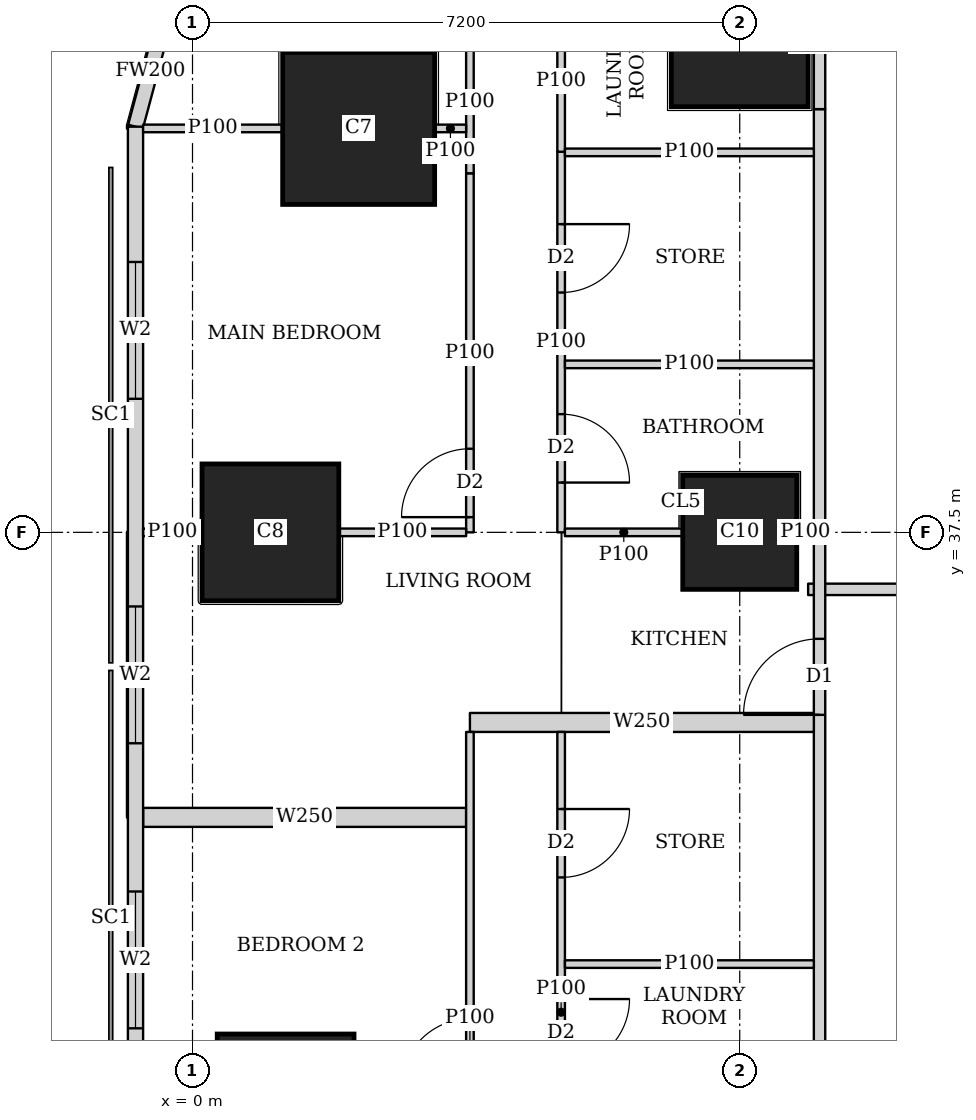
"""IFC4 building model, lengths in metres.
Left out: names, types, materials, properties, quantities, classifications, styles, units other than length and angle.
Written with IfcOpenShell. Run it as: python <this file> out.ifc"""

import sys

from ifc_helpers import new_model, si_unit, direction, frame, frame_2d, origin, origin_2d, place, context, subcontext, project, spatial, rectangle, extrude, element, fill, save


model = new_model("IFC4")
c1 = context("Model", 3, precision=1e-05, world=origin(), true_north=direction((0.0, 1.0)))
c2 = subcontext(c1, "Body", "Model", "MODEL_VIEW")
j1 = project(units=[si_unit("LENGTHUNIT", "METRE"), si_unit("PLANEANGLEUNIT", "RADIAN")], contexts=[c1])
p1 = place(None, origin())
s1 = spatial("IfcSite", under=j1, at=p1, CompositionType="ELEMENT")
p2 = place(p1, origin())
s2 = spatial("IfcBuilding", under=s1, at=p2, CompositionType="ELEMENT")
p3 = place(p2, frame((0.0, 0.0, 169.55)))
s3 = spatial("IfcBuildingStorey", under=s2, at=p3, CompositionType="ELEMENT", Elevation=169.55)
for number, where, z_axis, x_axis in (
    (1, (1.225, 30.0, 0.0), (0.0, 0.0, 1.0), (1.0, 0.0, 0.0)),
    (2, (1.025, 37.5, 0.0), (0.0, 0.0, 1.0), (1.0, 0.0, 0.0)),
):
    element("IfcColumn", number, at=place(p3, frame(where, z_axis=z_axis, x_axis=x_axis)), inside=s3, PredefinedType="COLUMN", context=c2, shape_type="SweptSolid", body=[
        extrude(rectangle(XDim=1.8, YDim=1.8, at=origin_2d()), origin(), (0.0, 0.0, 1.0), 3.75),
    ])
p4 = place(p3, frame((7.2, 37.5, 0.0), z_axis=(0.0, 0.0, 1.0), x_axis=(1.0, 0.0, 0.0)))
e3 = element("IfcColumn", 3, at=p4, inside=s3, PredefinedType="COLUMN", context=c2, shape_type="SweptSolid", body=[
    extrude(rectangle(XDim=1.5, YDim=1.5, at=origin_2d()), origin(), (0.0, 0.0, 1.0), 3.75),
])
p5 = place(p3, frame((2.186, 42.814, 0.0), z_axis=(0.0, 0.0, 1.0), x_axis=(1.0, 0.0, 0.0)))
e4 = element("IfcColumn", 4, at=p5, inside=s3, PredefinedType="COLUMN", context=c2, shape_type="SweptSolid", body=[
    extrude(rectangle(XDim=2.0, YDim=2.0, at=origin_2d()), origin(), (0.0, 0.0, 1.0), 3.75),
])
p6 = place(p3, frame((7.2, 44.0, 0.0), z_axis=(0.0, 0.0, 1.0), x_axis=(1.0, 0.0, 0.0)))
e5 = element("IfcColumn", 5, at=p6, inside=s3, PredefinedType="COLUMN", context=c2, shape_type="SweptSolid", body=[
    extrude(rectangle(XDim=1.8, YDim=1.8, at=origin_2d()), origin(), (0.0, 0.0, 1.0), 3.75),
])
p7 = place(p3, frame((-0.358, 44.298, 0.0), z_axis=(0.0, 0.0, 1.0), x_axis=(-0.259168954497, -0.965832000415, 0.0)))
e6 = element("IfcWall", 6, at=p7, inside=s3, PredefinedType="SOLIDWALL", context=c2, shape_type="SweptSolid", body=[
    extrude(rectangle(XDim=1.513, YDim=0.2, at=frame_2d((0.756, 0.0))), origin(), (0.0, 0.0, 1.0), 3.5),
])
p8 = place(p3, frame((-0.75, 42.837, 0.0), z_axis=(0.0, 0.0, 1.0), x_axis=(0.0, -1.0, 0.0)))
e7 = element("IfcWall", 7, at=p8, inside=s3, PredefinedType="SOLIDWALL", context=c2, shape_type="SweptSolid", body=[
    extrude(rectangle(XDim=40.674, YDim=0.2, at=frame_2d((20.337, 0.0))), origin(), (0.0, 0.0, 1.0), 3.5),
])
p9 = place(p8, frame((1.78, 0.0, 0.9)))
e8 = element("IfcOpeningElement", 8, at=p9, cuts=e7, PredefinedType="OPENING", context=c2, shape_type="SweptSolid", body=[
    extrude(rectangle(XDim=1.8, YDim=1.5, at=frame_2d((0.9, 0.75))), frame((0.0, 0.11, 0.0), z_axis=(0.0, -1.0, 0.0), x_axis=(1.0, 0.0, 0.0)), (0.0, 0.0, 1.0), 0.22),
])
p10 = place(p8, frame((6.312, 0.0, 0.9)))
e9 = element("IfcOpeningElement", 9, at=p10, cuts=e7, PredefinedType="OPENING", context=c2, shape_type="SweptSolid", body=[
    extrude(rectangle(XDim=1.8, YDim=1.5, at=frame_2d((0.9, 0.75))), frame((0.0, 0.11, 0.0), z_axis=(0.0, -1.0, 0.0), x_axis=(1.0, 0.0, 0.0)), (0.0, 0.0, 1.0), 0.22),
])
p11 = place(p8, frame((10.062, 0.0, 0.9)))
e10 = element("IfcOpeningElement", 10, at=p11, cuts=e7, PredefinedType="OPENING", context=c2, shape_type="SweptSolid", body=[
    extrude(rectangle(XDim=1.8, YDim=1.5, at=frame_2d((0.9, 0.75))), frame((0.0, 0.11, 0.0), z_axis=(0.0, -1.0, 0.0), x_axis=(1.0, 0.0, 0.0)), (0.0, 0.0, 1.0), 0.22),
])
p12 = place(p8, frame((13.812, 0.0, 0.9)))
e11 = element("IfcOpeningElement", 11, at=p12, cuts=e7, PredefinedType="OPENING", context=c2, shape_type="SweptSolid", body=[
    extrude(rectangle(XDim=1.8, YDim=1.5, at=frame_2d((0.9, 0.75))), frame((0.0, 0.11, 0.0), z_axis=(0.0, -1.0, 0.0), x_axis=(1.0, 0.0, 0.0)), (0.0, 0.0, 1.0), 0.22),
])
p13 = place(p8, frame((17.562, 0.0, 0.9)))
e12 = element("IfcOpeningElement", 12, at=p13, cuts=e7, PredefinedType="OPENING", context=c2, shape_type="SweptSolid", body=[
    extrude(rectangle(XDim=1.8, YDim=1.5, at=frame_2d((0.9, 0.75))), frame((0.0, 0.11, 0.0), z_axis=(0.0, -1.0, 0.0), x_axis=(1.0, 0.0, 0.0)), (0.0, 0.0, 1.0), 0.22),
])
p14 = place(p8, frame((21.312, 0.0, 0.9)))
e13 = element("IfcOpeningElement", 13, at=p14, cuts=e7, PredefinedType="OPENING", context=c2, shape_type="SweptSolid", body=[
    extrude(rectangle(XDim=1.8, YDim=1.5, at=frame_2d((0.9, 0.75))), frame((0.0, 0.11, 0.0), z_axis=(0.0, -1.0, 0.0), x_axis=(1.0, 0.0, 0.0)), (0.0, 0.0, 1.0), 0.22),
])
p15 = place(p8, frame((25.062, 0.0, 0.9)))
e14 = element("IfcOpeningElement", 14, at=p15, cuts=e7, PredefinedType="OPENING", context=c2, shape_type="SweptSolid", body=[
    extrude(rectangle(XDim=1.8, YDim=1.5, at=frame_2d((0.9, 0.75))), frame((0.0, 0.11, 0.0), z_axis=(0.0, -1.0, 0.0), x_axis=(1.0, 0.0, 0.0)), (0.0, 0.0, 1.0), 0.22),
])
p16 = place(p8, frame((28.812, 0.0, 0.9)))
e15 = element("IfcOpeningElement", 15, at=p16, cuts=e7, PredefinedType="OPENING", context=c2, shape_type="SweptSolid", body=[
    extrude(rectangle(XDim=1.8, YDim=1.5, at=frame_2d((0.9, 0.75))), frame((0.0, 0.11, 0.0), z_axis=(0.0, -1.0, 0.0), x_axis=(1.0, 0.0, 0.0)), (0.0, 0.0, 1.0), 0.22),
])
p17 = place(p8, frame((32.562, 0.0, 0.9)))
e16 = element("IfcOpeningElement", 16, at=p17, cuts=e7, PredefinedType="OPENING", context=c2, shape_type="SweptSolid", body=[
    extrude(rectangle(XDim=1.8, YDim=1.5, at=frame_2d((0.9, 0.75))), frame((0.0, 0.11, 0.0), z_axis=(0.0, -1.0, 0.0), x_axis=(1.0, 0.0, 0.0)), (0.0, 0.0, 1.0), 0.22),
])
p18 = place(p8, frame((37.094, 0.0, 0.9)))
e17 = element("IfcOpeningElement", 17, at=p18, cuts=e7, PredefinedType="OPENING", context=c2, shape_type="SweptSolid", body=[
    extrude(rectangle(XDim=1.8, YDim=1.5, at=frame_2d((0.9, 0.75))), frame((0.0, 0.11, 0.0), z_axis=(0.0, -1.0, 0.0), x_axis=(1.0, 0.0, 0.0)), (0.0, 0.0, 1.0), 0.22),
])
p19 = place(p3, frame((8.25, 1.957, 0.0), z_axis=(0.0, 0.0, 1.0), x_axis=(0.0, 1.0, 0.0)))
e18 = element("IfcWall", 18, at=p19, inside=s3, PredefinedType="SOLIDWALL", context=c2, shape_type="SweptSolid", body=[
    extrude(rectangle(XDim=41.111, YDim=0.15, at=frame_2d((20.556, 0.0))), origin(), (0.0, 0.0, 1.0), 3.5),
])
p20 = place(p19, frame((10.642, 0.0, 0.0)))
e19 = element("IfcOpeningElement", 19, at=p20, cuts=e18, PredefinedType="OPENING", context=c2, shape_type="SweptSolid", body=[
    extrude(rectangle(XDim=1.0, YDim=2.1, at=frame_2d((0.5, 1.05))), frame((0.0, 0.085, 0.0), z_axis=(0.0, -1.0, 0.0), x_axis=(1.0, 0.0, 0.0)), (0.0, 0.0, 1.0), 0.17),
])
p21 = place(p19, frame((15.042, 0.0, 0.0)))
e20 = element("IfcOpeningElement", 20, at=p21, cuts=e18, PredefinedType="OPENING", context=c2, shape_type="SweptSolid", body=[
    extrude(rectangle(XDim=1.0, YDim=2.1, at=frame_2d((0.5, 1.05))), frame((0.0, 0.085, 0.0), z_axis=(0.0, -1.0, 0.0), x_axis=(1.0, 0.0, 0.0)), (0.0, 0.0, 1.0), 0.17),
])
p22 = place(p19, frame((22.543, 0.0, 0.0)))
e21 = element("IfcOpeningElement", 21, at=p22, cuts=e18, PredefinedType="OPENING", context=c2, shape_type="SweptSolid", body=[
    extrude(rectangle(XDim=1.0, YDim=2.1, at=frame_2d((0.5, 1.05))), frame((0.0, 0.085, 0.0), z_axis=(0.0, -1.0, 0.0), x_axis=(1.0, 0.0, 0.0)), (0.0, 0.0, 1.0), 0.17),
])
p23 = place(p19, frame((33.142, 0.0, 0.0)))
e22 = element("IfcOpeningElement", 22, at=p23, cuts=e18, PredefinedType="OPENING", context=c2, shape_type="SweptSolid", body=[
    extrude(rectangle(XDim=1.0, YDim=2.1, at=frame_2d((0.5, 1.05))), frame((0.0, 0.085, 0.0), z_axis=(0.0, -1.0, 0.0), x_axis=(1.0, 0.0, 0.0)), (0.0, 0.0, 1.0), 0.17),
])
p24 = place(p3, frame((8.25, 43.068, 0.0), z_axis=(0.0, 0.0, 1.0), x_axis=(0.0, 1.0, 0.0)))
e23 = element("IfcWall", 23, at=p24, inside=s3, PredefinedType="SOLIDWALL", context=c2, shape_type="SweptSolid", body=[
    extrude(rectangle(XDim=1.805, YDim=0.15, at=frame_2d((0.902, 0.0))), origin(), (0.0, 0.0, 1.0), 2.1),
])
p25 = place(p3, frame((8.1, 36.75, 0.0), z_axis=(0.0, 0.0, 1.0), x_axis=(1.0, 0.0, 0.0)))
e24 = element("IfcWall", 24, at=p25, inside=s3, PredefinedType="SOLIDWALL", context=c2, shape_type="SweptSolid", body=[
    extrude(rectangle(XDim=5.549, YDim=0.15, at=frame_2d((2.774, 0.0))), origin(), (0.0, 0.0, 1.0), 3.5),
])
p26 = place(p25, frame((2.725, 0.0, 0.0)))
e25 = element("IfcOpeningElement", 25, at=p26, cuts=e24, PredefinedType="OPENING", context=c2, shape_type="SweptSolid", body=[
    extrude(rectangle(XDim=1.0, YDim=2.1, at=frame_2d((0.5, 1.05))), frame((0.0, 0.085, 0.0), z_axis=(0.0, -1.0, 0.0), x_axis=(1.0, 0.0, 0.0)), (0.0, 0.0, 1.0), 0.17),
])
p27 = place(p3, frame((3.65, 26.25, 0.0), z_axis=(0.0, 0.0, 1.0), x_axis=(0.0, 1.0, 0.0)))
e26 = element("IfcWall", 26, at=p27, inside=s3, PredefinedType="PARTITIONING", context=c2, shape_type="SweptSolid", body=[
    extrude(rectangle(XDim=8.624, YDim=0.1, at=frame_2d((4.312, 0.0))), origin(), (0.0, 0.0, 1.0), 3.5),
])
p28 = place(p27, frame((1.449, 0.0, 0.0)))
e27 = element("IfcOpeningElement", 27, at=p28, cuts=e26, PredefinedType="OPENING", context=c2, shape_type="SweptSolid", body=[
    extrude(rectangle(XDim=0.9, YDim=2.1, at=frame_2d((0.45, 1.05))), frame((0.0, 0.06, 0.0), z_axis=(0.0, -1.0, 0.0), x_axis=(1.0, 0.0, 0.0)), (0.0, 0.0, 1.0), 0.12),
])
p29 = place(p27, frame((3.95, 0.0, 0.0)))
e28 = element("IfcOpeningElement", 28, at=p29, cuts=e26, PredefinedType="OPENING", context=c2, shape_type="SweptSolid", body=[
    extrude(rectangle(XDim=0.9, YDim=2.1, at=frame_2d((0.45, 1.05))), frame((0.0, 0.06, 0.0), z_axis=(0.0, -1.0, 0.0), x_axis=(1.0, 0.0, 0.0)), (0.0, 0.0, 1.0), 0.12),
])
p30 = place(p3, frame((4.85, 27.499, 0.0), z_axis=(0.0, 0.0, 1.0), x_axis=(0.0, 1.0, 0.0)))
e29 = element("IfcWall", 29, at=p30, inside=s3, PredefinedType="PARTITIONING", context=c2, shape_type="SweptSolid", body=[
    extrude(rectangle(XDim=7.375, YDim=0.1, at=frame_2d((3.688, 0.0))), origin(), (0.0, 0.0, 1.0), 3.5),
])
p31 = place(p30, frame((0.8, 0.0, 0.0)))
e30 = element("IfcOpeningElement", 30, at=p31, cuts=e29, PredefinedType="OPENING", context=c2, shape_type="SweptSolid", body=[
    extrude(rectangle(XDim=0.9, YDim=2.1, at=frame_2d((0.45, 1.05))), frame((0.0, 0.06, 0.0), z_axis=(0.0, -1.0, 0.0), x_axis=(1.0, 0.0, 0.0)), (0.0, 0.0, 1.0), 0.12),
])
p32 = place(p30, frame((2.961, 0.0, 0.0)))
e31 = element("IfcOpeningElement", 31, at=p32, cuts=e29, PredefinedType="OPENING", context=c2, shape_type="SweptSolid", body=[
    extrude(rectangle(XDim=0.9, YDim=2.1, at=frame_2d((0.45, 1.05))), frame((0.0, 0.06, 0.0), z_axis=(0.0, -1.0, 0.0), x_axis=(1.0, 0.0, 0.0)), (0.0, 0.0, 1.0), 0.12),
])
p33 = place(p30, frame((5.461, 0.0, 0.0)))
e32 = element("IfcOpeningElement", 32, at=p33, cuts=e29, PredefinedType="OPENING", context=c2, shape_type="SweptSolid", body=[
    extrude(rectangle(XDim=0.9, YDim=2.1, at=frame_2d((0.45, 1.05))), frame((0.0, 0.06, 0.0), z_axis=(0.0, -1.0, 0.0), x_axis=(1.0, 0.0, 0.0)), (0.0, 0.0, 1.0), 0.12),
])
p34 = place(p3, frame((4.9, 31.82, 0.0), z_axis=(0.0, 0.0, 1.0), x_axis=(1.0, 0.0, 0.0)))
e33 = element("IfcWall", 33, at=p34, inside=s3, PredefinedType="PARTITIONING", context=c2, shape_type="SweptSolid", body=[
    extrude(rectangle(XDim=3.275, YDim=0.1, at=frame_2d((1.638, 0.0))), origin(), (0.0, 0.0, 1.0), 3.5),
])
p35 = place(p3, frame((3.65, 37.5, 0.0), z_axis=(0.0, 0.0, 1.0), x_axis=(0.0, 1.0, 0.0)))
e34 = element("IfcWall", 34, at=p35, inside=s3, PredefinedType="PARTITIONING", context=c2, shape_type="SweptSolid", body=[
    extrude(rectangle(XDim=4.724, YDim=0.1, at=frame_2d((2.362, 0.0))), origin(), (0.0, 0.0, 1.0), 3.5),
])
p36 = place(p35, frame((0.2, 0.0, 0.0)))
e35 = element("IfcOpeningElement", 35, at=p36, cuts=e34, PredefinedType="OPENING", context=c2, shape_type="SweptSolid", body=[
    extrude(rectangle(XDim=0.9, YDim=2.1, at=frame_2d((0.45, 1.05))), frame((0.0, 0.06, 0.0), z_axis=(0.0, -1.0, 0.0), x_axis=(1.0, 0.0, 0.0)), (0.0, 0.0, 1.0), 0.12),
])
p37 = place(p3, frame((3.65, 42.224, 0.0), z_axis=(0.0, 0.0, 1.0), x_axis=(0.0, 1.0, 0.0)))
e36 = element("IfcWall", 36, at=p37, inside=s3, PredefinedType="PARTITIONING", context=c2, shape_type="SweptSolid", body=[
    extrude(rectangle(XDim=1.873, YDim=0.1, at=frame_2d((0.937, 0.0))), origin(), (0.0, 0.0, 1.0), 2.1),
])
p38 = place(p3, frame((4.85, 37.5, 0.0), z_axis=(0.0, 0.0, 1.0), x_axis=(0.0, 1.0, 0.0)))
e37 = element("IfcWall", 37, at=p38, inside=s3, PredefinedType="PARTITIONING", context=c2, shape_type="SweptSolid", body=[
    extrude(rectangle(XDim=5.007, YDim=0.1, at=frame_2d((2.503, 0.0))), origin(), (0.0, 0.0, 1.0), 3.5),
])
p39 = place(p38, frame((0.655, 0.0, 0.0)))
e38 = element("IfcOpeningElement", 38, at=p39, cuts=e37, PredefinedType="OPENING", context=c2, shape_type="SweptSolid", body=[
    extrude(rectangle(XDim=0.9, YDim=2.1, at=frame_2d((0.45, 1.05))), frame((0.0, 0.06, 0.0), z_axis=(0.0, -1.0, 0.0), x_axis=(1.0, 0.0, 0.0)), (0.0, 0.0, 1.0), 0.12),
])
p40 = place(p38, frame((3.155, 0.0, 0.0)))
e39 = element("IfcOpeningElement", 39, at=p40, cuts=e37, PredefinedType="OPENING", context=c2, shape_type="SweptSolid", body=[
    extrude(rectangle(XDim=0.9, YDim=2.1, at=frame_2d((0.45, 1.05))), frame((0.0, 0.06, 0.0), z_axis=(0.0, -1.0, 0.0), x_axis=(1.0, 0.0, 0.0)), (0.0, 0.0, 1.0), 0.12),
])
p41 = place(p3, frame((4.85, 42.507, 0.0), z_axis=(0.0, 0.0, 1.0), x_axis=(0.0, 1.0, 0.0)))
e40 = element("IfcWall", 40, at=p41, inside=s3, PredefinedType="PARTITIONING", context=c2, shape_type="SweptSolid", body=[
    extrude(rectangle(XDim=1.874, YDim=0.1, at=frame_2d((0.937, 0.0))), origin(), (0.0, 0.0, 1.0), 2.1),
])
p42 = place(p3, frame((-0.65, 37.5, 0.0), z_axis=(0.0, 0.0, 1.0), x_axis=(1.0, 0.0, 0.0)))
e41 = element("IfcWall", 41, at=p42, inside=s3, PredefinedType="PARTITIONING", context=c2, shape_type="SweptSolid", body=[
    extrude(rectangle(XDim=0.774, YDim=0.1, at=frame_2d((0.387, 0.0))), origin(), (0.0, 0.0, 1.0), 3.5),
])
p43 = place(p3, frame((1.926, 37.5, 0.0), z_axis=(0.0, 0.0, 1.0), x_axis=(1.0, 0.0, 0.0)))
e42 = element("IfcWall", 42, at=p43, inside=s3, PredefinedType="PARTITIONING", context=c2, shape_type="SweptSolid", body=[
    extrude(rectangle(XDim=1.674, YDim=0.1, at=frame_2d((0.837, 0.0))), origin(), (0.0, 0.0, 1.0), 2.1),
])
p44 = place(p3, frame((-0.65, 42.814, 0.0), z_axis=(0.0, 0.0, 1.0), x_axis=(1.0, 0.0, 0.0)))
e43 = element("IfcWall", 43, at=p44, inside=s3, PredefinedType="PARTITIONING", context=c2, shape_type="SweptSolid", body=[
    extrude(rectangle(XDim=1.835, YDim=0.1, at=frame_2d((0.917, 0.0))), origin(), (0.0, 0.0, 1.0), 3.5),
])
p45 = place(p3, frame((3.187, 42.814, 0.0), z_axis=(0.0, 0.0, 1.0), x_axis=(1.0, 0.0, 0.0)))
e44 = element("IfcWall", 44, at=p45, inside=s3, PredefinedType="PARTITIONING", context=c2, shape_type="SweptSolid", body=[
    extrude(rectangle(XDim=0.413, YDim=0.1, at=frame_2d((0.207, 0.0))), origin(), (0.0, 0.0, 1.0), 2.1),
])
p46 = place(p3, frame((4.9, 37.5, 0.0), z_axis=(0.0, 0.0, 1.0), x_axis=(1.0, 0.0, 0.0)))
e45 = element("IfcWall", 45, at=p46, inside=s3, PredefinedType="PARTITIONING", context=c2, shape_type="SweptSolid", body=[
    extrude(rectangle(XDim=1.549, YDim=0.1, at=frame_2d((0.774, 0.0))), origin(), (0.0, 0.0, 1.0), 3.5),
])
p47 = place(p3, frame((7.951, 37.5, 0.0), z_axis=(0.0, 0.0, 1.0), x_axis=(1.0, 0.0, 0.0)))
e46 = element("IfcWall", 46, at=p47, inside=s3, PredefinedType="PARTITIONING", context=c2, shape_type="SweptSolid", body=[
    extrude(rectangle(XDim=0.224, YDim=0.1, at=frame_2d((0.112, 0.0))), origin(), (0.0, 0.0, 1.0), 3.5),
])
for number, where, z_axis, x_axis in (
    (47, (4.9, 42.499, 0.0), (0.0, 0.0, 1.0), (1.0, 0.0, 0.0)),
    (48, (4.9, 39.71, 0.0), (0.0, 0.0, 1.0), (1.0, 0.0, 0.0)),
):
    element("IfcWall", number, at=place(p3, frame(where, z_axis=z_axis, x_axis=x_axis)), inside=s3, PredefinedType="PARTITIONING", context=c2, shape_type="SweptSolid", body=[
        extrude(rectangle(XDim=3.275, YDim=0.1, at=frame_2d((1.638, 0.0))), origin(), (0.0, 0.0, 1.0), 3.5),
    ])
p48 = place(p3, frame((-0.65, 33.75, 0.0), z_axis=(0.0, 0.0, 1.0), x_axis=(1.0, 0.0, 0.0)))
e49 = element("IfcWall", 49, at=p48, inside=s3, PredefinedType="SOLIDWALL", context=c2, shape_type="SweptSolid", body=[
    extrude(rectangle(XDim=4.25, YDim=0.25, at=frame_2d((2.125, 0.0))), origin(), (0.0, 0.0, 1.0), 2.1),
])
p49 = place(p3, frame((3.65, 34.999, 0.0), z_axis=(0.0, 0.0, 1.0), x_axis=(1.0, 0.0, 0.0)))
e50 = element("IfcWall", 50, at=p49, inside=s3, PredefinedType="SOLIDWALL", context=c2, shape_type="SweptSolid", body=[
    extrude(rectangle(XDim=4.525, YDim=0.25, at=frame_2d((2.263, 0.0))), origin(), (0.0, 0.0, 1.0), 3.5),
])
p50 = place(p9, origin())
e51 = element("IfcWindow", 51, at=p50, inside=s3, PartitioningType="SINGLE_PANEL", PredefinedType="WINDOW", context=c2, shape_type="SweptSolid", body=[
    extrude(rectangle(XDim=1.8, YDim=1.5, at=frame_2d((0.9, 0.75))), frame((0.0, 0.03, 0.0), z_axis=(0.0, -1.0, 0.0), x_axis=(1.0, 0.0, 0.0)), (0.0, 0.0, 1.0), 0.06),
])
fill(e8, e51)
p51 = place(p10, origin())
e52 = element("IfcWindow", 52, at=p51, inside=s3, PartitioningType="SINGLE_PANEL", PredefinedType="WINDOW", context=c2, shape_type="SweptSolid", body=[
    extrude(rectangle(XDim=1.8, YDim=1.5, at=frame_2d((0.9, 0.75))), frame((0.0, 0.03, 0.0), z_axis=(0.0, -1.0, 0.0), x_axis=(1.0, 0.0, 0.0)), (0.0, 0.0, 1.0), 0.06),
])
fill(e9, e52)
p52 = place(p11, origin())
e53 = element("IfcWindow", 53, at=p52, inside=s3, PartitioningType="SINGLE_PANEL", PredefinedType="WINDOW", context=c2, shape_type="SweptSolid", body=[
    extrude(rectangle(XDim=1.8, YDim=1.5, at=frame_2d((0.9, 0.75))), frame((0.0, 0.03, 0.0), z_axis=(0.0, -1.0, 0.0), x_axis=(1.0, 0.0, 0.0)), (0.0, 0.0, 1.0), 0.06),
])
fill(e10, e53)
p53 = place(p29, origin())
e54 = element("IfcDoor", 54, at=p53, inside=s3, OperationType="SINGLE_SWING_LEFT", PredefinedType="DOOR", context=c2, shape_type="SweptSolid", body=[
    extrude(rectangle(XDim=0.9, YDim=2.1, at=frame_2d((0.45, 1.05))), frame((0.0, 0.025, 0.0), z_axis=(0.0, -1.0, 0.0), x_axis=(1.0, 0.0, 0.0)), (0.0, 0.0, 1.0), 0.05),
])
fill(e28, e54)
p54 = place(p32, origin())
e55 = element("IfcDoor", 55, at=p54, inside=s3, OperationType="SINGLE_SWING_LEFT", PredefinedType="DOOR", context=c2, shape_type="SweptSolid", body=[
    extrude(rectangle(XDim=0.9, YDim=2.1, at=frame_2d((0.45, 1.05))), frame((0.0, 0.025, 0.0), z_axis=(0.0, -1.0, 0.0), x_axis=(1.0, 0.0, 0.0)), (0.0, 0.0, 1.0), 0.05),
])
fill(e31, e55)
p55 = place(p33, origin())
e56 = element("IfcDoor", 56, at=p55, inside=s3, OperationType="SINGLE_SWING_LEFT", PredefinedType="DOOR", context=c2, shape_type="SweptSolid", body=[
    extrude(rectangle(XDim=0.9, YDim=2.1, at=frame_2d((0.45, 1.05))), frame((0.0, 0.025, 0.0), z_axis=(0.0, -1.0, 0.0), x_axis=(1.0, 0.0, 0.0)), (0.0, 0.0, 1.0), 0.05),
])
fill(e32, e56)
p56 = place(p36, origin())
e57 = element("IfcDoor", 57, at=p56, inside=s3, OperationType="SINGLE_SWING_LEFT", PredefinedType="DOOR", context=c2, shape_type="SweptSolid", body=[
    extrude(rectangle(XDim=0.9, YDim=2.1, at=frame_2d((0.45, 1.05))), frame((0.0, 0.025, 0.0), z_axis=(0.0, -1.0, 0.0), x_axis=(1.0, 0.0, 0.0)), (0.0, 0.0, 1.0), 0.05),
])
fill(e35, e57)
p57 = place(p39, origin())
e58 = element("IfcDoor", 58, at=p57, inside=s3, OperationType="SINGLE_SWING_RIGHT", PredefinedType="DOOR", context=c2, shape_type="SweptSolid", body=[
    extrude(rectangle(XDim=0.9, YDim=2.1, at=frame_2d((0.45, 1.05))), frame((0.0, 0.025, 0.0), z_axis=(0.0, -1.0, 0.0), x_axis=(1.0, 0.0, 0.0)), (0.0, 0.0, 1.0), 0.05),
])
fill(e38, e58)
p58 = place(p40, origin())
e59 = element("IfcDoor", 59, at=p58, inside=s3, OperationType="SINGLE_SWING_LEFT", PredefinedType="DOOR", context=c2, shape_type="SweptSolid", body=[
    extrude(rectangle(XDim=0.9, YDim=2.1, at=frame_2d((0.45, 1.05))), frame((0.0, 0.025, 0.0), z_axis=(0.0, -1.0, 0.0), x_axis=(1.0, 0.0, 0.0)), (0.0, 0.0, 1.0), 0.05),
])
fill(e39, e59)
p59 = place(p23, origin())
e60 = element("IfcDoor", 60, at=p59, inside=s3, OperationType="SINGLE_SWING_LEFT", PredefinedType="DOOR", context=c2, shape_type="SweptSolid", body=[
    extrude(rectangle(XDim=1.0, YDim=2.1, at=frame_2d((0.5, 1.05))), frame((0.0, 0.025, 0.0), z_axis=(0.0, -1.0, 0.0), x_axis=(1.0, 0.0, 0.0)), (0.0, 0.0, 1.0), 0.05),
])
fill(e22, e60)
save(model, sys.argv[1])
